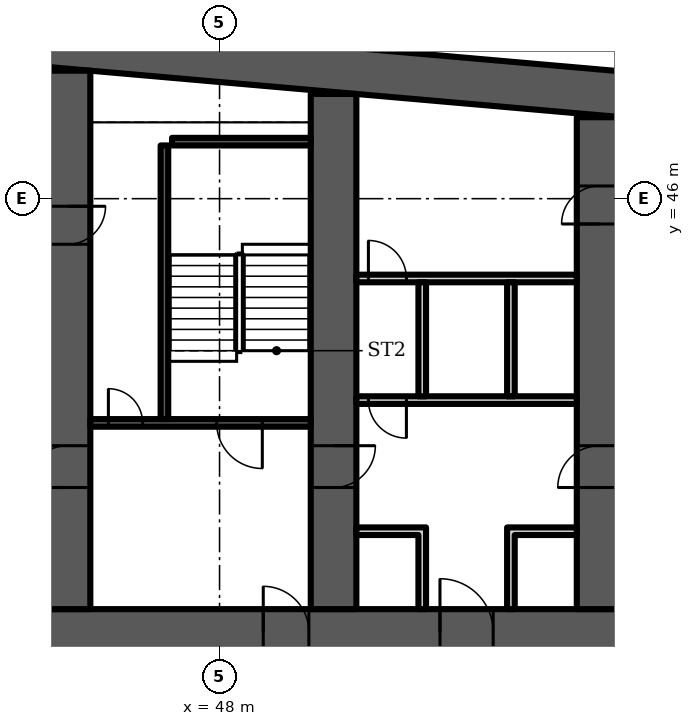
"""IFC4 building model, lengths in metres.
Left out: names, types, materials, properties, quantities, classifications, styles, units other than length and angle.
Written with IfcOpenShell. Run it as: python <this file> out.ifc"""

import sys

from ifc_helpers import new_model, si_unit, direction, frame, frame_2d, origin, place, context, subcontext, project, spatial, polyline, rectangle, outline, extrude, element, fill, save


model = new_model("IFC4")
c1 = context("Model", 3, precision=1e-05, world=origin(), true_north=direction((0.0, 1.0)))
c2 = subcontext(c1, "Body", "Model", "MODEL_VIEW")
j1 = project(units=[si_unit("LENGTHUNIT", "METRE"), si_unit("PLANEANGLEUNIT", "RADIAN")], contexts=[c1])
p1 = place(None, origin())
s1 = spatial("IfcSite", under=j1, at=p1, CompositionType="ELEMENT")
p2 = place(p1, origin())
s2 = spatial("IfcBuilding", under=s1, at=p2, CompositionType="ELEMENT")
p3 = place(p2, frame((0.0, 0.0, 88.3)))
s3 = spatial("IfcBuildingStorey", under=s2, at=p3, CompositionType="ELEMENT", Elevation=88.3)
p4 = place(p3, frame((0.0, 0.0, -0.0)))
e1 = element("IfcWall", 1, at=p4, inside=s3, PredefinedType="SHEAR", context=c2, shape_type="SweptSolid", body=[
    extrude(outline(polyline([(9.0, 47.583), (37.0, 50.032), (65.0, 47.583), (65.0, 48.787), (37.0, 51.237), (9.0, 48.787), (9.0, 47.583)])), origin(), (0.0, 0.0, 1.0), 3.6),
])
p5 = place(p3, frame((9.0, 34.6, 0.0), z_axis=(0.0, 0.0, 1.0), x_axis=(1.0, 0.0, 0.0)))
e2 = element("IfcWall", 2, at=p5, inside=s3, PredefinedType="SHEAR", context=c2, shape_type="SweptSolid", body=[
    extrude(rectangle(XDim=56.0, YDim=1.2, at=frame_2d((28.0, 0.0))), origin(), (0.0, 0.0, 1.0), 3.6),
])
p6 = place(p5, frame((2.0, 0.0, 0.0)))
e3 = element("IfcOpeningElement", 3, at=p6, cuts=e2, PredefinedType="OPENING", context=c2, shape_type="SweptSolid", body=[
    extrude(rectangle(XDim=1.0, YDim=2.1, at=frame_2d((0.5, 1.05))), frame((0.0, 0.61, 0.0), z_axis=(0.0, -1.0, 0.0), x_axis=(1.0, 0.0, 0.0)), (0.0, 0.0, 1.0), 1.22),
])
p7 = place(p5, frame((4.6, 0.0, 0.0)))
e4 = element("IfcOpeningElement", 4, at=p7, cuts=e2, PredefinedType="OPENING", context=c2, shape_type="SweptSolid", body=[
    extrude(rectangle(XDim=1.0, YDim=2.1, at=frame_2d((0.5, 1.05))), frame((0.0, 0.61, 0.0), z_axis=(0.0, -1.0, 0.0), x_axis=(1.0, 0.0, 0.0)), (0.0, 0.0, 1.0), 1.22),
])
p8 = place(p5, frame((7.867, 0.0, 0.0)))
e5 = element("IfcOpeningElement", 5, at=p8, cuts=e2, PredefinedType="OPENING", context=c2, shape_type="SweptSolid", body=[
    extrude(rectangle(XDim=1.1, YDim=2.1, at=frame_2d((0.55, 1.05))), frame((0.0, 0.61, 0.0), z_axis=(0.0, -1.0, 0.0), x_axis=(1.0, 0.0, 0.0)), (0.0, 0.0, 1.0), 1.22),
])
p9 = place(p5, frame((12.033, 0.0, 0.0)))
e6 = element("IfcOpeningElement", 6, at=p9, cuts=e2, PredefinedType="OPENING", context=c2, shape_type="SweptSolid", body=[
    extrude(rectangle(XDim=1.1, YDim=2.1, at=frame_2d((0.55, 1.05))), frame((0.0, 0.61, 0.0), z_axis=(0.0, -1.0, 0.0), x_axis=(1.0, 0.0, 0.0)), (0.0, 0.0, 1.0), 1.22),
])
p10 = place(p5, frame((9.8, 0.0, 0.0)))
e7 = element("IfcOpeningElement", 7, at=p10, cuts=e2, PredefinedType="OPENING", context=c2, shape_type="SweptSolid", body=[
    extrude(rectangle(XDim=1.4, YDim=2.1, at=frame_2d((0.7, 1.05))), frame((0.0, 0.61, 0.0), z_axis=(0.0, -1.0, 0.0), x_axis=(1.0, 0.0, 0.0)), (0.0, 0.0, 1.0), 1.22),
])
p11 = place(p5, frame((14.65, 0.0, 0.0)))
e8 = element("IfcOpeningElement", 8, at=p11, cuts=e2, PredefinedType="OPENING", context=c2, shape_type="SweptSolid", body=[
    extrude(rectangle(XDim=1.2, YDim=2.1, at=frame_2d((0.6, 1.05))), frame((0.0, 0.61, 0.0), z_axis=(0.0, -1.0, 0.0), x_axis=(1.0, 0.0, 0.0)), (0.0, 0.0, 1.0), 1.22),
])
p12 = place(p5, frame((21.867, 0.0, 0.0)))
e9 = element("IfcOpeningElement", 9, at=p12, cuts=e2, PredefinedType="OPENING", context=c2, shape_type="SweptSolid", body=[
    extrude(rectangle(XDim=1.1, YDim=2.1, at=frame_2d((0.55, 1.05))), frame((0.0, 0.61, 0.0), z_axis=(0.0, -1.0, 0.0), x_axis=(1.0, 0.0, 0.0)), (0.0, 0.0, 1.0), 1.22),
])
p13 = place(p5, frame((26.033, 0.0, 0.0)))
e10 = element("IfcOpeningElement", 10, at=p13, cuts=e2, PredefinedType="OPENING", context=c2, shape_type="SweptSolid", body=[
    extrude(rectangle(XDim=1.1, YDim=2.1, at=frame_2d((0.55, 1.05))), frame((0.0, 0.61, 0.0), z_axis=(0.0, -1.0, 0.0), x_axis=(1.0, 0.0, 0.0)), (0.0, 0.0, 1.0), 1.22),
])
p14 = place(p5, frame((23.8, 0.0, 0.0)))
e11 = element("IfcOpeningElement", 11, at=p14, cuts=e2, PredefinedType="OPENING", context=c2, shape_type="SweptSolid", body=[
    extrude(rectangle(XDim=1.4, YDim=2.1, at=frame_2d((0.7, 1.05))), frame((0.0, 0.61, 0.0), z_axis=(0.0, -1.0, 0.0), x_axis=(1.0, 0.0, 0.0)), (0.0, 0.0, 1.0), 1.22),
])
p15 = place(p5, frame((28.867, 0.0, 0.0)))
e12 = element("IfcOpeningElement", 12, at=p15, cuts=e2, PredefinedType="OPENING", context=c2, shape_type="SweptSolid", body=[
    extrude(rectangle(XDim=1.1, YDim=2.1, at=frame_2d((0.55, 1.05))), frame((0.0, 0.61, 0.0), z_axis=(0.0, -1.0, 0.0), x_axis=(1.0, 0.0, 0.0)), (0.0, 0.0, 1.0), 1.22),
])
p16 = place(p5, frame((33.033, 0.0, 0.0)))
e13 = element("IfcOpeningElement", 13, at=p16, cuts=e2, PredefinedType="OPENING", context=c2, shape_type="SweptSolid", body=[
    extrude(rectangle(XDim=1.1, YDim=2.1, at=frame_2d((0.55, 1.05))), frame((0.0, 0.61, 0.0), z_axis=(0.0, -1.0, 0.0), x_axis=(1.0, 0.0, 0.0)), (0.0, 0.0, 1.0), 1.22),
])
p17 = place(p5, frame((40.15, 0.0, 0.0)))
e14 = element("IfcOpeningElement", 14, at=p17, cuts=e2, PredefinedType="OPENING", context=c2, shape_type="SweptSolid", body=[
    extrude(rectangle(XDim=1.2, YDim=2.1, at=frame_2d((0.6, 1.05))), frame((0.0, 0.61, 0.0), z_axis=(0.0, -1.0, 0.0), x_axis=(1.0, 0.0, 0.0)), (0.0, 0.0, 1.0), 1.22),
])
p18 = place(p5, frame((44.8, 0.0, 0.0)))
e15 = element("IfcOpeningElement", 15, at=p18, cuts=e2, PredefinedType="OPENING", context=c2, shape_type="SweptSolid", body=[
    extrude(rectangle(XDim=1.4, YDim=2.1, at=frame_2d((0.7, 1.05))), frame((0.0, 0.61, 0.0), z_axis=(0.0, -1.0, 0.0), x_axis=(1.0, 0.0, 0.0)), (0.0, 0.0, 1.0), 1.22),
])
p19 = place(p5, frame((49.867, 0.0, 0.0)))
e16 = element("IfcOpeningElement", 16, at=p19, cuts=e2, PredefinedType="OPENING", context=c2, shape_type="SweptSolid", body=[
    extrude(rectangle(XDim=1.1, YDim=2.1, at=frame_2d((0.55, 1.05))), frame((0.0, 0.61, 0.0), z_axis=(0.0, -1.0, 0.0), x_axis=(1.0, 0.0, 0.0)), (0.0, 0.0, 1.0), 1.22),
])
p20 = place(p5, frame((53.5, 0.0, 0.0)))
e17 = element("IfcOpeningElement", 17, at=p20, cuts=e2, PredefinedType="OPENING", context=c2, shape_type="SweptSolid", body=[
    extrude(rectangle(XDim=1.1, YDim=2.1, at=frame_2d((0.55, 1.05))), frame((0.0, 0.61, 0.0), z_axis=(0.0, -1.0, 0.0), x_axis=(1.0, 0.0, 0.0)), (0.0, 0.0, 1.0), 1.22),
])
p21 = place(p5, frame((51.567, 0.0, 0.0)))
e18 = element("IfcOpeningElement", 18, at=p21, cuts=e2, PredefinedType="OPENING", context=c2, shape_type="SweptSolid", body=[
    extrude(rectangle(XDim=1.4, YDim=2.1, at=frame_2d((0.7, 1.05))), frame((0.0, 0.61, 0.0), z_axis=(0.0, -1.0, 0.0), x_axis=(1.0, 0.0, 0.0)), (0.0, 0.0, 1.0), 1.22),
])
p22 = place(p3, frame((44.0, 35.2, 0.0), z_axis=(0.0, 0.0, 1.0), x_axis=(0.0, 1.0, 0.0)))
e19 = element("IfcWall", 19, at=p22, inside=s3, PredefinedType="SHEAR", context=c2, shape_type="SweptSolid", body=[
    extrude(rectangle(XDim=14.168, YDim=1.2, at=frame_2d((7.084, 0.0))), origin(), (0.0, 0.0, 1.0), 3.6),
])
p23 = place(p22, frame((3.2, 0.0, 0.0)))
e20 = element("IfcOpeningElement", 20, at=p23, cuts=e19, PredefinedType="OPENING", context=c2, shape_type="SweptSolid", body=[
    extrude(rectangle(XDim=1.1, YDim=2.1, at=frame_2d((0.55, 1.05))), frame((0.0, 0.61, 0.0), z_axis=(0.0, -1.0, 0.0), x_axis=(1.0, 0.0, 0.0)), (0.0, 0.0, 1.0), 1.22),
])
p24 = place(p22, frame((9.6, 0.0, 0.0)))
e21 = element("IfcOpeningElement", 21, at=p24, cuts=e19, PredefinedType="OPENING", context=c2, shape_type="SweptSolid", body=[
    extrude(rectangle(XDim=1.0, YDim=2.1, at=frame_2d((0.5, 1.05))), frame((0.0, 0.61, 0.0), z_axis=(0.0, -1.0, 0.0), x_axis=(1.0, 0.0, 0.0)), (0.0, 0.0, 1.0), 1.22),
])
p25 = place(p3, frame((51.0, 35.2, 0.0), z_axis=(0.0, 0.0, 1.0), x_axis=(0.0, 1.0, 0.0)))
e22 = element("IfcWall", 22, at=p25, inside=s3, PredefinedType="SHEAR", context=c2, shape_type="SweptSolid", body=[
    extrude(rectangle(XDim=13.555, YDim=1.2, at=frame_2d((6.778, 0.0))), origin(), (0.0, 0.0, 1.0), 3.6),
])
p26 = place(p25, frame((3.2, 0.0, 0.0)))
e23 = element("IfcOpeningElement", 23, at=p26, cuts=e22, PredefinedType="OPENING", context=c2, shape_type="SweptSolid", body=[
    extrude(rectangle(XDim=1.1, YDim=2.1, at=frame_2d((0.55, 1.05))), frame((0.0, 0.61, 0.0), z_axis=(0.0, -1.0, 0.0), x_axis=(1.0, 0.0, 0.0)), (0.0, 0.0, 1.0), 1.22),
])
p27 = place(p3, frame((58.0, 35.2, 0.0), z_axis=(0.0, 0.0, 1.0), x_axis=(0.0, 1.0, 0.0)))
e24 = element("IfcWall", 24, at=p27, inside=s3, PredefinedType="SHEAR", context=c2, shape_type="SweptSolid", body=[
    extrude(rectangle(XDim=12.943, YDim=1.2, at=frame_2d((6.471, 0.0))), origin(), (0.0, 0.0, 1.0), 3.6),
])
p28 = place(p27, frame((10.134, 0.0, 0.0)))
e25 = element("IfcOpeningElement", 25, at=p28, cuts=e24, PredefinedType="OPENING", context=c2, shape_type="SweptSolid", body=[
    extrude(rectangle(XDim=1.0, YDim=2.1, at=frame_2d((0.5, 1.05))), frame((0.0, 0.61, 0.0), z_axis=(0.0, -1.0, 0.0), x_axis=(1.0, 0.0, 0.0)), (0.0, 0.0, 1.0), 1.22),
])
p29 = place(p27, frame((3.2, 0.0, 0.0)))
e26 = element("IfcOpeningElement", 26, at=p29, cuts=e24, PredefinedType="OPENING", context=c2, shape_type="SweptSolid", body=[
    extrude(rectangle(XDim=1.1, YDim=2.1, at=frame_2d((0.55, 1.05))), frame((0.0, 0.61, 0.0), z_axis=(0.0, -1.0, 0.0), x_axis=(1.0, 0.0, 0.0)), (0.0, 0.0, 1.0), 1.22),
])
p30 = place(p3, frame((44.6, 40.1, 0.0), z_axis=(0.0, 0.0, 1.0), x_axis=(1.0, 0.0, 0.0)))
e27 = element("IfcWall", 27, at=p30, inside=s3, PredefinedType="SHEAR", context=c2, shape_type="SweptSolid", body=[
    extrude(rectangle(XDim=5.8, YDim=0.2, at=frame_2d((2.9, 0.0))), origin(), (0.0, 0.0, 1.0), 3.15),
])
p31 = place(p30, frame((3.325, 0.0, 0.0)))
e28 = element("IfcOpeningElement", 28, at=p31, cuts=e27, PredefinedType="OPENING", context=c2, shape_type="SweptSolid", body=[
    extrude(rectangle(XDim=1.2, YDim=2.1, at=frame_2d((0.6, 1.05))), frame((0.0, 0.11, 0.0), z_axis=(0.0, -1.0, 0.0), x_axis=(1.0, 0.0, 0.0)), (0.0, 0.0, 1.0), 0.22),
])
p32 = place(p30, frame((0.475, 0.0, 0.0)))
e29 = element("IfcOpeningElement", 29, at=p32, cuts=e27, PredefinedType="OPENING", context=c2, shape_type="SweptSolid", body=[
    extrude(rectangle(XDim=0.9, YDim=2.1, at=frame_2d((0.45, 1.05))), frame((0.0, 0.11, 0.0), z_axis=(0.0, -1.0, 0.0), x_axis=(1.0, 0.0, 0.0)), (0.0, 0.0, 1.0), 0.22),
])
p33 = place(p3, frame((46.55, 40.2, 0.0), z_axis=(0.0, 0.0, 1.0), x_axis=(0.0, 1.0, 0.0)))
e30 = element("IfcWall", 30, at=p33, inside=s3, PredefinedType="SHEAR", context=c2, shape_type="SweptSolid", body=[
    extrude(rectangle(XDim=7.2, YDim=0.2, at=frame_2d((3.6, 0.0))), origin(), (0.0, 0.0, 1.0), 3.15),
])
p34 = place(p3, frame((46.75, 47.5, 0.0), z_axis=(0.0, 0.0, 1.0), x_axis=(1.0, 0.0, 0.0)))
e31 = element("IfcWall", 31, at=p34, inside=s3, PredefinedType="SHEAR", context=c2, shape_type="SweptSolid", body=[
    extrude(rectangle(XDim=3.65, YDim=0.2, at=frame_2d((1.825, 0.0))), origin(), (0.0, 0.0, 1.0), 3.15),
])
p35 = place(p3, frame((51.6, 40.7, 0.0), z_axis=(0.0, 0.0, 1.0), x_axis=(1.0, 0.0, 0.0)))
e32 = element("IfcWall", 32, at=p35, inside=s3, PredefinedType="PARTITIONING", context=c2, shape_type="SweptSolid", body=[
    extrude(rectangle(XDim=5.8, YDim=0.2, at=frame_2d((2.9, 0.0))), origin(), (0.0, 0.0, 1.0), 3.15),
])
p36 = place(p35, frame((0.317, 0.0, 0.0)))
e33 = element("IfcOpeningElement", 33, at=p36, cuts=e32, PredefinedType="OPENING", context=c2, shape_type="SweptSolid", body=[
    extrude(rectangle(XDim=1.0, YDim=2.1, at=frame_2d((0.5, 1.05))), frame((0.0, 0.11, 0.0), z_axis=(0.0, -1.0, 0.0), x_axis=(1.0, 0.0, 0.0)), (0.0, 0.0, 1.0), 0.22),
])
p37 = place(p3, frame((51.6, 43.9, 0.0), z_axis=(0.0, 0.0, 1.0), x_axis=(1.0, 0.0, 0.0)))
e34 = element("IfcWall", 34, at=p37, inside=s3, PredefinedType="PARTITIONING", context=c2, shape_type="SweptSolid", body=[
    extrude(rectangle(XDim=5.8, YDim=0.2, at=frame_2d((2.9, 0.0))), origin(), (0.0, 0.0, 1.0), 3.15),
])
p38 = place(p37, frame((0.317, 0.0, 0.0)))
e35 = element("IfcOpeningElement", 35, at=p38, cuts=e34, PredefinedType="OPENING", context=c2, shape_type="SweptSolid", body=[
    extrude(rectangle(XDim=1.0, YDim=2.1, at=frame_2d((0.5, 1.05))), frame((0.0, 0.11, 0.0), z_axis=(0.0, -1.0, 0.0), x_axis=(1.0, 0.0, 0.0)), (0.0, 0.0, 1.0), 0.22),
])
p39 = place(p3, frame((0.0, 0.0, -0.0)))
e36 = element("IfcWall", 36, at=p39, inside=s3, PredefinedType="PARTITIONING", context=c2, shape_type="SweptSolid", body=[
    extrude(outline(polyline([(53.233, 37.15), (51.6, 37.15), (51.6, 37.35), (53.233, 37.35), (53.433, 37.35), (53.433, 35.2), (53.233, 35.2), (53.233, 37.15)])), origin(), (0.0, 0.0, 1.0), 3.15),
])
p40 = place(p3, frame((0.0, 0.0, -0.0)))
e37 = element("IfcWall", 37, at=p40, inside=s3, PredefinedType="PARTITIONING", context=c2, shape_type="SweptSolid", body=[
    extrude(outline(polyline([(55.567, 37.35), (55.767, 37.35), (57.4, 37.35), (57.4, 37.15), (55.767, 37.15), (55.767, 35.2), (55.567, 35.2), (55.567, 37.35)])), origin(), (0.0, 0.0, 1.0), 3.15),
])
p41 = place(p3, frame((0.0, 0.0, -0.0)))
e38 = element("IfcWall", 38, at=p41, inside=s3, PredefinedType="PARTITIONING", context=c2, shape_type="SweptSolid", body=[
    extrude(outline(polyline([(53.233, 40.8), (53.233, 43.8), (53.433, 43.8), (53.433, 40.8), (53.233, 40.8)])), origin(), (0.0, 0.0, 1.0), 3.15),
])
p42 = place(p3, frame((0.0, 0.0, -0.0)))
e39 = element("IfcWall", 39, at=p42, inside=s3, PredefinedType="PARTITIONING", context=c2, shape_type="SweptSolid", body=[
    extrude(outline(polyline([(55.567, 40.8), (55.567, 43.8), (55.767, 43.8), (55.767, 40.8), (55.567, 40.8)])), origin(), (0.0, 0.0, 1.0), 3.15),
])
p43 = place(p31, origin())
e40 = element("IfcDoor", 40, at=p43, inside=s3, OperationType="SINGLE_SWING_RIGHT", PredefinedType="DOOR", context=c2, shape_type="SweptSolid", body=[
    extrude(rectangle(XDim=1.2, YDim=2.1, at=frame_2d((0.6, 1.05))), frame((0.0, 0.025, 0.0), z_axis=(0.0, -1.0, 0.0), x_axis=(1.0, 0.0, 0.0)), (0.0, 0.0, 1.0), 0.05),
])
fill(e28, e40)
p44 = place(p32, origin())
e41 = element("IfcDoor", 41, at=p44, inside=s3, OperationType="SINGLE_SWING_LEFT", PredefinedType="DOOR", context=c2, shape_type="SweptSolid", body=[
    extrude(rectangle(XDim=0.9, YDim=2.1, at=frame_2d((0.45, 1.05))), frame((0.0, 0.025, 0.0), z_axis=(0.0, -1.0, 0.0), x_axis=(1.0, 0.0, 0.0)), (0.0, 0.0, 1.0), 0.05),
])
fill(e29, e41)
p45 = place(p17, origin())
e42 = element("IfcDoor", 42, at=p45, inside=s3, OperationType="SINGLE_SWING_LEFT", PredefinedType="DOOR", context=c2, shape_type="SweptSolid", body=[
    extrude(rectangle(XDim=1.2, YDim=2.1, at=frame_2d((0.6, 1.05))), frame((0.0, 0.025, 0.0), z_axis=(0.0, -1.0, 0.0), x_axis=(1.0, 0.0, 0.0)), (0.0, 0.0, 1.0), 0.05),
])
fill(e14, e42)
p46 = place(p18, origin())
e43 = element("IfcDoor", 43, at=p46, inside=s3, OperationType="DOUBLE_DOOR_SINGLE_SWING", PredefinedType="DOOR", context=c2, shape_type="SweptSolid", body=[
    extrude(rectangle(XDim=1.4, YDim=2.1, at=frame_2d((0.7, 1.05))), frame((0.0, 0.025, 0.0), z_axis=(0.0, -1.0, 0.0), x_axis=(1.0, 0.0, 0.0)), (0.0, 0.0, 1.0), 0.05),
])
fill(e15, e43)
p47 = place(p36, origin())
e44 = element("IfcDoor", 44, at=p47, inside=s3, OperationType="SINGLE_SWING_RIGHT", PredefinedType="DOOR", context=c2, shape_type="SweptSolid", body=[
    extrude(rectangle(XDim=1.0, YDim=2.1, at=frame_2d((0.5, 1.05))), frame((0.0, 0.025, 0.0), z_axis=(0.0, -1.0, 0.0), x_axis=(1.0, 0.0, 0.0)), (0.0, 0.0, 1.0), 0.05),
])
fill(e33, e44)
p48 = place(p38, origin())
e45 = element("IfcDoor", 45, at=p48, inside=s3, OperationType="SINGLE_SWING_LEFT", PredefinedType="DOOR", context=c2, shape_type="SweptSolid", body=[
    extrude(rectangle(XDim=1.0, YDim=2.1, at=frame_2d((0.5, 1.05))), frame((0.0, 0.025, 0.0), z_axis=(0.0, -1.0, 0.0), x_axis=(1.0, 0.0, 0.0)), (0.0, 0.0, 1.0), 0.05),
])
fill(e35, e45)
p49 = place(p28, origin())
e46 = element("IfcDoor", 46, at=p49, inside=s3, OperationType="SINGLE_SWING_LEFT", PredefinedType="DOOR", context=c2, shape_type="SweptSolid", body=[
    extrude(rectangle(XDim=1.0, YDim=2.1, at=frame_2d((0.5, 1.05))), frame((0.0, 0.6, 0.0), z_axis=(0.0, -1.0, 0.0), x_axis=(1.0, 0.0, 0.0)), (0.0, 0.0, 1.0), 1.199),
])
fill(e25, e46)
p50 = place(p23, origin())
e47 = element("IfcDoor", 47, at=p50, inside=s3, OperationType="SINGLE_SWING_LEFT", PredefinedType="DOOR", context=c2, shape_type="SweptSolid", body=[
    extrude(rectangle(XDim=1.1, YDim=2.1, at=frame_2d((0.55, 1.05))), frame((0.0, 0.025, 0.0), z_axis=(0.0, -1.0, 0.0), x_axis=(1.0, 0.0, 0.0)), (0.0, 0.0, 1.0), 0.05),
])
fill(e20, e47)
p51 = place(p24, origin())
e48 = element("IfcDoor", 48, at=p51, inside=s3, OperationType="SINGLE_SWING_RIGHT", PredefinedType="DOOR", context=c2, shape_type="SweptSolid", body=[
    extrude(rectangle(XDim=1.0, YDim=2.1, at=frame_2d((0.5, 1.05))), frame((0.0, 0.6, 0.0), z_axis=(0.0, -1.0, 0.0), x_axis=(1.0, 0.0, 0.0)), (0.0, 0.0, 1.0), 1.199),
])
fill(e21, e48)
p52 = place(p26, origin())
e49 = element("IfcDoor", 49, at=p52, inside=s3, OperationType="SINGLE_SWING_RIGHT", PredefinedType="DOOR", context=c2, shape_type="SweptSolid", body=[
    extrude(rectangle(XDim=1.1, YDim=2.1, at=frame_2d((0.55, 1.05))), frame((0.0, 0.025, 0.0), z_axis=(0.0, -1.0, 0.0), x_axis=(1.0, 0.0, 0.0)), (0.0, 0.0, 1.0), 0.05),
])
fill(e23, e49)
p53 = place(p29, origin())
e50 = element("IfcDoor", 50, at=p53, inside=s3, OperationType="SINGLE_SWING_LEFT", PredefinedType="DOOR", context=c2, shape_type="SweptSolid", body=[
    extrude(rectangle(XDim=1.1, YDim=2.1, at=frame_2d((0.55, 1.05))), frame((0.0, 0.025, 0.0), z_axis=(0.0, -1.0, 0.0), x_axis=(1.0, 0.0, 0.0)), (0.0, 0.0, 1.0), 0.05),
])
fill(e26, e50)
save(model, sys.argv[1])
